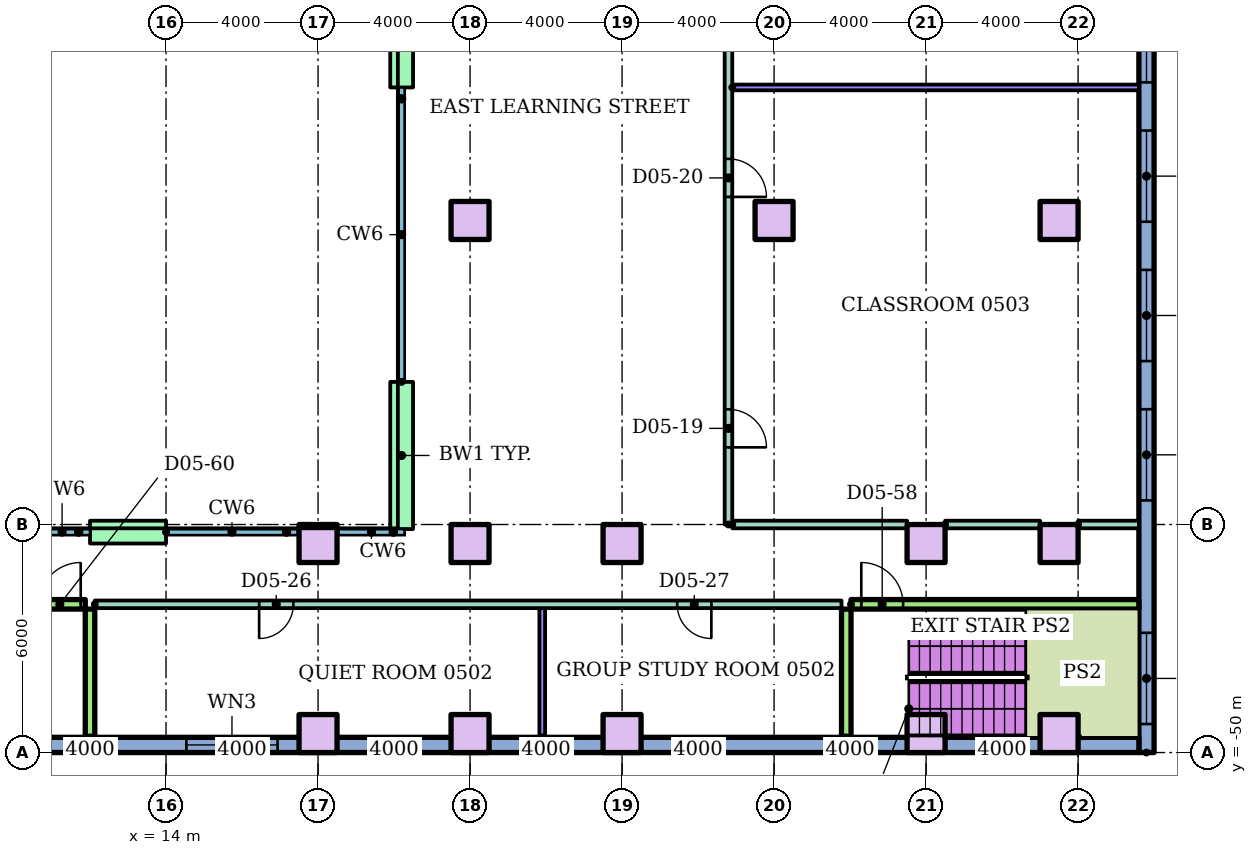
"""IFC4 building model, lengths in metres.
Left out: names, types, materials, properties, quantities, classifications, styles, units other than length and angle.
Written with IfcOpenShell. Run it as: python <this file> out.ifc"""

import sys

from ifc_helpers import new_model, si_unit, direction, frame, frame_2d, origin, origin_2d, place, context, subcontext, project, spatial, rectangle, extrude, element, fill, save


model = new_model("IFC4")
c1 = context("Model", 3, precision=1e-05, world=origin(), true_north=direction((0.0, 1.0)))
c2 = subcontext(c1, "Body", "Model", "MODEL_VIEW")
j1 = project(units=[si_unit("LENGTHUNIT", "METRE"), si_unit("PLANEANGLEUNIT", "RADIAN")], contexts=[c1])
p1 = place(None, origin())
s1 = spatial("IfcSite", under=j1, at=p1, CompositionType="ELEMENT")
p2 = place(p1, origin())
s2 = spatial("IfcBuilding", under=s1, at=p2, CompositionType="ELEMENT")
p3 = place(p2, frame((0.0, 0.0, 22.0)))
s3 = spatial("IfcBuildingStorey", under=s2, at=p3, CompositionType="ELEMENT", Elevation=22.0)
for number, where in (
    (1, (18.0, -49.5, 0.0)),
    (2, (22.0, -49.5, 0.0)),
    (3, (26.0, -49.5, 0.0)),
    (4, (34.0, -49.5, 0.0)),
    (5, (37.5, -49.5, 0.0)),
    (6, (18.0, -44.5, 0.0)),
    (7, (22.0, -44.5, 0.0)),
    (8, (26.0, -44.5, 0.0)),
    (9, (34.0, -44.5, 0.0)),
    (10, (37.5, -44.5, 0.0)),
    (11, (22.0, -36.0, 0.0)),
    (12, (30.0, -36.0, 0.0)),
    (13, (37.5, -36.0, 0.0)),
):
    element("IfcColumn", number, at=place(p3, frame(where)), inside=s3, PredefinedType="COLUMN", context=c2, shape_type="SweptSolid", body=[
        extrude(rectangle(XDim=1.0, YDim=1.0, at=origin_2d()), origin(), (0.0, 0.0, 1.0), 3.7),
    ])
p4 = place(p3, frame((39.8, -50.0, 0.0), z_axis=(0.0, 0.0, 1.0), x_axis=(0.0, 1.0, 0.0)))
e14 = element("IfcWall", 14, at=p4, inside=s3, PredefinedType="STANDARD", context=c2, shape_type="SweptSolid", body=[
    extrude(rectangle(XDim=70.0, YDim=0.4, at=frame_2d((35.0, 0.0))), origin(), (0.0, 0.0, 1.0), 3.7),
])
p5 = place(p4, frame((0.75, 0.0, 0.9)))
e15 = element("IfcOpeningElement", 15, at=p5, cuts=e14, PredefinedType="OPENING", context=c2, shape_type="SweptSolid", body=[
    extrude(rectangle(XDim=2.4, YDim=2.1, at=frame_2d((1.2, 1.05))), frame((0.0, 0.21, 0.0), z_axis=(0.0, -1.0, 0.0), x_axis=(1.0, 0.0, 0.0)), (0.0, 0.0, 1.0), 0.42),
])
p6 = place(p4, frame((6.633, 0.0, 0.9)))
e16 = element("IfcOpeningElement", 16, at=p6, cuts=e14, PredefinedType="OPENING", context=c2, shape_type="SweptSolid", body=[
    extrude(rectangle(XDim=2.4, YDim=2.1, at=frame_2d((1.2, 1.05))), frame((0.0, 0.21, 0.0), z_axis=(0.0, -1.0, 0.0), x_axis=(1.0, 0.0, 0.0)), (0.0, 0.0, 1.0), 0.42),
])
p7 = place(p4, frame((10.3, 0.0, 0.9)))
e17 = element("IfcOpeningElement", 17, at=p7, cuts=e14, PredefinedType="OPENING", context=c2, shape_type="SweptSolid", body=[
    extrude(rectangle(XDim=2.4, YDim=2.1, at=frame_2d((1.2, 1.05))), frame((0.0, 0.21, 0.0), z_axis=(0.0, -1.0, 0.0), x_axis=(1.0, 0.0, 0.0)), (0.0, 0.0, 1.0), 0.42),
])
p8 = place(p4, frame((13.967, 0.0, 0.9)))
e18 = element("IfcOpeningElement", 18, at=p8, cuts=e14, PredefinedType="OPENING", context=c2, shape_type="SweptSolid", body=[
    extrude(rectangle(XDim=2.4, YDim=2.1, at=frame_2d((1.2, 1.05))), frame((0.0, 0.21, 0.0), z_axis=(0.0, -1.0, 0.0), x_axis=(1.0, 0.0, 0.0)), (0.0, 0.0, 1.0), 0.42),
])
p9 = place(p4, frame((17.633, 0.0, 0.9)))
e19 = element("IfcOpeningElement", 19, at=p9, cuts=e14, PredefinedType="OPENING", context=c2, shape_type="SweptSolid", body=[
    extrude(rectangle(XDim=2.4, YDim=2.1, at=frame_2d((1.2, 1.05))), frame((0.0, 0.21, 0.0), z_axis=(0.0, -1.0, 0.0), x_axis=(1.0, 0.0, 0.0)), (0.0, 0.0, 1.0), 0.42),
])
p10 = place(p4, frame((21.3, 0.0, 0.9)))
e20 = element("IfcOpeningElement", 20, at=p10, cuts=e14, PredefinedType="OPENING", context=c2, shape_type="SweptSolid", body=[
    extrude(rectangle(XDim=2.4, YDim=2.1, at=frame_2d((1.2, 1.05))), frame((0.0, 0.21, 0.0), z_axis=(0.0, -1.0, 0.0), x_axis=(1.0, 0.0, 0.0)), (0.0, 0.0, 1.0), 0.42),
])
p11 = place(p4, frame((24.967, 0.0, 0.9)))
e21 = element("IfcOpeningElement", 21, at=p11, cuts=e14, PredefinedType="OPENING", context=c2, shape_type="SweptSolid", body=[
    extrude(rectangle(XDim=2.4, YDim=2.1, at=frame_2d((1.2, 1.05))), frame((0.0, 0.21, 0.0), z_axis=(0.0, -1.0, 0.0), x_axis=(1.0, 0.0, 0.0)), (0.0, 0.0, 1.0), 0.42),
])
p12 = place(p4, frame((28.863, 0.0, 0.9)))
e22 = element("IfcOpeningElement", 22, at=p12, cuts=e14, PredefinedType="OPENING", context=c2, shape_type="SweptSolid", body=[
    extrude(rectangle(XDim=2.4, YDim=2.1, at=frame_2d((1.2, 1.05))), frame((0.0, 0.21, 0.0), z_axis=(0.0, -1.0, 0.0), x_axis=(1.0, 0.0, 0.0)), (0.0, 0.0, 1.0), 0.42),
])
p13 = place(p4, frame((32.988, 0.0, 0.9)))
e23 = element("IfcOpeningElement", 23, at=p13, cuts=e14, PredefinedType="OPENING", context=c2, shape_type="SweptSolid", body=[
    extrude(rectangle(XDim=2.4, YDim=2.1, at=frame_2d((1.2, 1.05))), frame((0.0, 0.21, 0.0), z_axis=(0.0, -1.0, 0.0), x_axis=(1.0, 0.0, 0.0)), (0.0, 0.0, 1.0), 0.42),
])
p14 = place(p4, frame((37.113, 0.0, 0.9)))
e24 = element("IfcOpeningElement", 24, at=p14, cuts=e14, PredefinedType="OPENING", context=c2, shape_type="SweptSolid", body=[
    extrude(rectangle(XDim=2.4, YDim=2.1, at=frame_2d((1.2, 1.05))), frame((0.0, 0.21, 0.0), z_axis=(0.0, -1.0, 0.0), x_axis=(1.0, 0.0, 0.0)), (0.0, 0.0, 1.0), 0.42),
])
p15 = place(p4, frame((41.238, 0.0, 0.9)))
e25 = element("IfcOpeningElement", 25, at=p15, cuts=e14, PredefinedType="OPENING", context=c2, shape_type="SweptSolid", body=[
    extrude(rectangle(XDim=2.4, YDim=2.1, at=frame_2d((1.2, 1.05))), frame((0.0, 0.21, 0.0), z_axis=(0.0, -1.0, 0.0), x_axis=(1.0, 0.0, 0.0)), (0.0, 0.0, 1.0), 0.42),
])
p16 = place(p4, frame((45.363, 0.0, 0.9)))
e26 = element("IfcOpeningElement", 26, at=p16, cuts=e14, PredefinedType="OPENING", context=c2, shape_type="SweptSolid", body=[
    extrude(rectangle(XDim=2.4, YDim=2.1, at=frame_2d((1.2, 1.05))), frame((0.0, 0.21, 0.0), z_axis=(0.0, -1.0, 0.0), x_axis=(1.0, 0.0, 0.0)), (0.0, 0.0, 1.0), 0.42),
])
p17 = place(p4, frame((49.488, 0.0, 0.9)))
e27 = element("IfcOpeningElement", 27, at=p17, cuts=e14, PredefinedType="OPENING", context=c2, shape_type="SweptSolid", body=[
    extrude(rectangle(XDim=2.4, YDim=2.1, at=frame_2d((1.2, 1.05))), frame((0.0, 0.21, 0.0), z_axis=(0.0, -1.0, 0.0), x_axis=(1.0, 0.0, 0.0)), (0.0, 0.0, 1.0), 0.42),
])
p18 = place(p4, frame((53.613, 0.0, 0.9)))
e28 = element("IfcOpeningElement", 28, at=p18, cuts=e14, PredefinedType="OPENING", context=c2, shape_type="SweptSolid", body=[
    extrude(rectangle(XDim=2.4, YDim=2.1, at=frame_2d((1.2, 1.05))), frame((0.0, 0.21, 0.0), z_axis=(0.0, -1.0, 0.0), x_axis=(1.0, 0.0, 0.0)), (0.0, 0.0, 1.0), 0.42),
])
p19 = place(p4, frame((57.738, 0.0, 0.9)))
e29 = element("IfcOpeningElement", 29, at=p19, cuts=e14, PredefinedType="OPENING", context=c2, shape_type="SweptSolid", body=[
    extrude(rectangle(XDim=2.4, YDim=2.1, at=frame_2d((1.2, 1.05))), frame((0.0, 0.21, 0.0), z_axis=(0.0, -1.0, 0.0), x_axis=(1.0, 0.0, 0.0)), (0.0, 0.0, 1.0), 0.42),
])
p20 = place(p4, frame((62.05, 0.0, 0.9)))
e30 = element("IfcOpeningElement", 30, at=p20, cuts=e14, PredefinedType="OPENING", context=c2, shape_type="SweptSolid", body=[
    extrude(rectangle(XDim=2.4, YDim=2.1, at=frame_2d((1.2, 1.05))), frame((0.0, 0.21, 0.0), z_axis=(0.0, -1.0, 0.0), x_axis=(1.0, 0.0, 0.0)), (0.0, 0.0, 1.0), 0.42),
])
p21 = place(p4, frame((66.55, 0.0, 0.9)))
e31 = element("IfcOpeningElement", 31, at=p21, cuts=e14, PredefinedType="OPENING", context=c2, shape_type="SweptSolid", body=[
    extrude(rectangle(XDim=2.4, YDim=2.1, at=frame_2d((1.2, 1.05))), frame((0.0, 0.21, 0.0), z_axis=(0.0, -1.0, 0.0), x_axis=(1.0, 0.0, 0.0)), (0.0, 0.0, 1.0), 0.42),
])
p22 = place(p3, frame((-39.6, -49.8, 0.0)))
e32 = element("IfcWall", 32, at=p22, inside=s3, PredefinedType="STANDARD", context=c2, shape_type="SweptSolid", body=[
    extrude(rectangle(XDim=79.2, YDim=0.4, at=frame_2d((39.6, 0.0))), origin(), (0.0, 0.0, 1.0), 3.7),
])
p23 = place(p22, frame((10.665, 0.0, 0.9)))
e33 = element("IfcOpeningElement", 33, at=p23, cuts=e32, PredefinedType="OPENING", context=c2, shape_type="SweptSolid", body=[
    extrude(rectangle(XDim=2.4, YDim=2.1, at=frame_2d((1.2, 1.05))), frame((0.0, 0.21, 0.0), z_axis=(0.0, -1.0, 0.0), x_axis=(1.0, 0.0, 0.0)), (0.0, 0.0, 1.0), 0.42),
])
p24 = place(p22, frame((18.665, 0.0, 0.9)))
e34 = element("IfcOpeningElement", 34, at=p24, cuts=e32, PredefinedType="OPENING", context=c2, shape_type="SweptSolid", body=[
    extrude(rectangle(XDim=2.4, YDim=2.1, at=frame_2d((1.2, 1.05))), frame((0.0, 0.21, 0.0), z_axis=(0.0, -1.0, 0.0), x_axis=(1.0, 0.0, 0.0)), (0.0, 0.0, 1.0), 0.42),
])
p25 = place(p22, frame((22.135, 0.0, 0.9)))
e35 = element("IfcOpeningElement", 35, at=p25, cuts=e32, PredefinedType="OPENING", context=c2, shape_type="SweptSolid", body=[
    extrude(rectangle(XDim=2.4, YDim=2.1, at=frame_2d((1.2, 1.05))), frame((0.0, 0.21, 0.0), z_axis=(0.0, -1.0, 0.0), x_axis=(1.0, 0.0, 0.0)), (0.0, 0.0, 1.0), 0.42),
])
p26 = place(p22, frame((30.135, 0.0, 0.9)))
e36 = element("IfcOpeningElement", 36, at=p26, cuts=e32, PredefinedType="OPENING", context=c2, shape_type="SweptSolid", body=[
    extrude(rectangle(XDim=2.05, YDim=2.1, at=frame_2d((1.025, 1.05))), frame((0.0, 0.21, 0.0), z_axis=(0.0, -1.0, 0.0), x_axis=(1.0, 0.0, 0.0)), (0.0, 0.0, 1.0), 0.42),
])
p27 = place(p22, frame((38.135, 0.0, 0.9)))
e37 = element("IfcOpeningElement", 37, at=p27, cuts=e32, PredefinedType="OPENING", context=c2, shape_type="SweptSolid", body=[
    extrude(rectangle(XDim=2.4, YDim=2.1, at=frame_2d((1.2, 1.05))), frame((0.0, 0.21, 0.0), z_axis=(0.0, -1.0, 0.0), x_axis=(1.0, 0.0, 0.0)), (0.0, 0.0, 1.0), 0.42),
])
p28 = place(p22, frame((47.015, 0.0, 0.9)))
e38 = element("IfcOpeningElement", 38, at=p28, cuts=e32, PredefinedType="OPENING", context=c2, shape_type="SweptSolid", body=[
    extrude(rectangle(XDim=1.52, YDim=2.1, at=frame_2d((0.76, 1.05))), frame((0.0, 0.21, 0.0), z_axis=(0.0, -1.0, 0.0), x_axis=(1.0, 0.0, 0.0)), (0.0, 0.0, 1.0), 0.42),
])
p29 = place(p22, frame((54.135, 0.0, 0.9)))
e39 = element("IfcOpeningElement", 39, at=p29, cuts=e32, PredefinedType="OPENING", context=c2, shape_type="SweptSolid", body=[
    extrude(rectangle(XDim=2.4, YDim=2.1, at=frame_2d((1.2, 1.05))), frame((0.0, 0.21, 0.0), z_axis=(0.0, -1.0, 0.0), x_axis=(1.0, 0.0, 0.0)), (0.0, 0.0, 1.0), 0.42),
])
p30 = place(p3, frame((14.0, -44.2, 0.0), z_axis=(0.0, 0.0, 1.0), x_axis=(-1.0, 0.0, 0.0)))
e40 = element("IfcWall", 40, at=p30, inside=s3, PredefinedType="STANDARD", context=c2, shape_type="SweptSolid", body=[
    extrude(rectangle(XDim=2.0, YDim=0.6, at=frame_2d((1.0, 0.0))), origin(), (0.0, 0.0, 1.0), 3.7),
])
p31 = place(p3, frame((20.2, -28.96, 0.0), z_axis=(0.0, 0.0, 1.0), x_axis=(0.0, -1.0, 0.0)))
e41 = element("IfcWall", 41, at=p31, inside=s3, PredefinedType="STANDARD", context=c2, shape_type="SweptSolid", body=[
    extrude(rectangle(XDim=3.54, YDim=0.6, at=frame_2d((1.77, 0.0))), origin(), (0.0, 0.0, 1.0), 3.7),
])
p32 = place(p3, frame((20.2, -40.247, 0.0), z_axis=(0.0, 0.0, 1.0), x_axis=(0.0, -1.0, 0.0)))
e42 = element("IfcWall", 42, at=p32, inside=s3, PredefinedType="STANDARD", context=c2, shape_type="SweptSolid", body=[
    extrude(rectangle(XDim=3.874, YDim=0.6, at=frame_2d((1.937, 0.0))), origin(), (0.0, 0.0, 1.0), 3.7),
])
p33 = place(p3, frame((12.125, -46.1, 0.0)))
e43 = element("IfcWall", 43, at=p33, inside=s3, PredefinedType="PARTITIONING", context=c2, shape_type="SweptSolid", body=[
    extrude(rectangle(XDim=19.65, YDim=0.2, at=frame_2d((9.825, 0.0))), origin(), (0.0, 0.0, 1.0), 3.2),
])
p34 = place(p33, frame((4.325, 0.0, 0.0)))
e44 = element("IfcOpeningElement", 44, at=p34, cuts=e43, PredefinedType="OPENING", context=c2, shape_type="SweptSolid", body=[
    extrude(rectangle(XDim=0.9, YDim=2.1, at=frame_2d((0.45, 1.05))), frame((0.0, 0.11, 0.0), z_axis=(0.0, -1.0, 0.0), x_axis=(1.0, 0.0, 0.0)), (0.0, 0.0, 1.0), 0.22),
])
p35 = place(p33, frame((15.325, 0.0, 0.0)))
e45 = element("IfcOpeningElement", 45, at=p35, cuts=e43, PredefinedType="OPENING", context=c2, shape_type="SweptSolid", body=[
    extrude(rectangle(XDim=0.9, YDim=2.1, at=frame_2d((0.45, 1.05))), frame((0.0, 0.11, 0.0), z_axis=(0.0, -1.0, 0.0), x_axis=(1.0, 0.0, 0.0)), (0.0, 0.0, 1.0), 0.22),
])
p36 = place(p3, frame((4.125, -46.1, 0.0)))
e46 = element("IfcWall", 46, at=p36, inside=s3, PredefinedType="SOLIDWALL", context=c2, shape_type="SweptSolid", body=[
    extrude(rectangle(XDim=7.75, YDim=0.25, at=frame_2d((3.875, 0.0))), origin(), (0.0, 0.0, 1.0), 3.7),
])
p37 = place(p36, frame((6.53, 0.0, 0.0)))
e47 = element("IfcOpeningElement", 47, at=p37, cuts=e46, PredefinedType="OPENING", context=c2, shape_type="SweptSolid", body=[
    extrude(rectangle(XDim=1.1, YDim=2.1, at=frame_2d((0.55, 1.05))), frame((0.0, 0.135, 0.0), z_axis=(0.0, -1.0, 0.0), x_axis=(1.0, 0.0, 0.0)), (0.0, 0.0, 1.0), 0.27),
])
p38 = place(p3, frame((32.025, -46.1, 0.0)))
e48 = element("IfcWall", 48, at=p38, inside=s3, PredefinedType="SOLIDWALL", context=c2, shape_type="SweptSolid", body=[
    extrude(rectangle(XDim=7.575, YDim=0.25, at=frame_2d((3.788, 0.0))), origin(), (0.0, 0.0, 1.0), 3.7),
])
p39 = place(p38, frame((0.27, 0.0, 0.0)))
e49 = element("IfcOpeningElement", 49, at=p39, cuts=e48, PredefinedType="OPENING", context=c2, shape_type="SweptSolid", body=[
    extrude(rectangle(XDim=1.1, YDim=2.1, at=frame_2d((0.55, 1.05))), frame((0.0, 0.135, 0.0), z_axis=(0.0, -1.0, 0.0), x_axis=(1.0, 0.0, 0.0)), (0.0, 0.0, 1.0), 0.27),
])
p40 = place(p3, frame((28.9, -44.0, 0.0)))
e50 = element("IfcWall", 50, at=p40, inside=s3, PredefinedType="PARTITIONING", context=c2, shape_type="SweptSolid", body=[
    extrude(rectangle(XDim=4.6, YDim=0.2, at=frame_2d((2.3, 0.0))), origin(), (0.0, 0.0, 1.0), 3.2),
])
p41 = place(p3, frame((34.5, -44.0, 0.0)))
e51 = element("IfcWall", 51, at=p41, inside=s3, PredefinedType="PARTITIONING", context=c2, shape_type="SweptSolid", body=[
    extrude(rectangle(XDim=2.5, YDim=0.2, at=frame_2d((1.25, 0.0))), origin(), (0.0, 0.0, 1.0), 3.2),
])
p42 = place(p3, frame((38.0, -44.0, 0.0)))
e52 = element("IfcWall", 52, at=p42, inside=s3, PredefinedType="PARTITIONING", context=c2, shape_type="SweptSolid", body=[
    extrude(rectangle(XDim=1.6, YDim=0.2, at=frame_2d((0.8, 0.0))), origin(), (0.0, 0.0, 1.0), 3.2),
])
p43 = place(p3, frame((28.9, -32.5, 0.0)))
e53 = element("IfcWall", 53, at=p43, inside=s3, PredefinedType="PARTITIONING", context=c2, shape_type="SweptSolid", body=[
    extrude(rectangle(XDim=10.7, YDim=0.15, at=frame_2d((5.35, 0.0))), origin(), (0.0, 0.0, 1.0), 3.2),
])
p44 = place(p3, frame((12.0, -49.6, 0.0), z_axis=(0.0, 0.0, 1.0), x_axis=(0.0, 1.0, 0.0)))
e54 = element("IfcWall", 54, at=p44, inside=s3, PredefinedType="SOLIDWALL", context=c2, shape_type="SweptSolid", body=[
    extrude(rectangle(XDim=3.375, YDim=0.25, at=frame_2d((1.688, 0.0))), origin(), (0.0, 0.0, 1.0), 3.7),
])
p45 = place(p3, frame((23.9, -49.6, 0.0), z_axis=(0.0, 0.0, 1.0), x_axis=(0.0, 1.0, 0.0)))
e55 = element("IfcWall", 55, at=p45, inside=s3, PredefinedType="PARTITIONING", context=c2, shape_type="SweptSolid", body=[
    extrude(rectangle(XDim=3.4, YDim=0.15, at=frame_2d((1.7, 0.0))), origin(), (0.0, 0.0, 1.0), 3.2),
])
p46 = place(p3, frame((28.8, -44.0, 0.0), z_axis=(0.0, 0.0, 1.0), x_axis=(0.0, 1.0, 0.0)))
e56 = element("IfcWall", 56, at=p46, inside=s3, PredefinedType="PARTITIONING", context=c2, shape_type="SweptSolid", body=[
    extrude(rectangle(XDim=21.9, YDim=0.2, at=frame_2d((10.95, 0.0))), origin(), (0.0, 0.0, 1.0), 3.2),
])
p47 = place(p46, frame((2.03, 0.0, 0.0)))
e57 = element("IfcOpeningElement", 57, at=p47, cuts=e56, PredefinedType="OPENING", context=c2, shape_type="SweptSolid", body=[
    extrude(rectangle(XDim=1.0, YDim=2.1, at=frame_2d((0.5, 1.05))), frame((0.0, 0.11, 0.0), z_axis=(0.0, -1.0, 0.0), x_axis=(1.0, 0.0, 0.0)), (0.0, 0.0, 1.0), 0.22),
])
p48 = place(p46, frame((8.62, 0.0, 0.0)))
e58 = element("IfcOpeningElement", 58, at=p48, cuts=e56, PredefinedType="OPENING", context=c2, shape_type="SweptSolid", body=[
    extrude(rectangle(XDim=1.0, YDim=2.1, at=frame_2d((0.5, 1.05))), frame((0.0, 0.11, 0.0), z_axis=(0.0, -1.0, 0.0), x_axis=(1.0, 0.0, 0.0)), (0.0, 0.0, 1.0), 0.22),
])
p49 = place(p3, frame((31.9, -49.6, 0.0), z_axis=(0.0, 0.0, 1.0), x_axis=(0.0, 1.0, 0.0)))
e59 = element("IfcWall", 59, at=p49, inside=s3, PredefinedType="SOLIDWALL", context=c2, shape_type="SweptSolid", body=[
    extrude(rectangle(XDim=3.375, YDim=0.25, at=frame_2d((1.688, 0.0))), origin(), (0.0, 0.0, 1.0), 3.7),
])
p50 = place(p5, origin())
e60 = element("IfcWindow", 60, at=p50, inside=s3, PartitioningType="SINGLE_PANEL", PredefinedType="WINDOW", context=c2, shape_type="SweptSolid", body=[
    extrude(rectangle(XDim=2.4, YDim=2.1, at=frame_2d((1.2, 1.05))), frame((0.0, 0.03, 0.0), z_axis=(0.0, -1.0, 0.0), x_axis=(1.0, 0.0, 0.0)), (0.0, 0.0, 1.0), 0.06),
])
fill(e15, e60)
p51 = place(p6, origin())
e61 = element("IfcWindow", 61, at=p51, inside=s3, PartitioningType="SINGLE_PANEL", PredefinedType="WINDOW", context=c2, shape_type="SweptSolid", body=[
    extrude(rectangle(XDim=2.4, YDim=2.1, at=frame_2d((1.2, 1.05))), frame((0.0, 0.03, 0.0), z_axis=(0.0, -1.0, 0.0), x_axis=(1.0, 0.0, 0.0)), (0.0, 0.0, 1.0), 0.06),
])
fill(e16, e61)
p52 = place(p7, origin())
e62 = element("IfcWindow", 62, at=p52, inside=s3, PartitioningType="SINGLE_PANEL", PredefinedType="WINDOW", context=c2, shape_type="SweptSolid", body=[
    extrude(rectangle(XDim=2.4, YDim=2.1, at=frame_2d((1.2, 1.05))), frame((0.0, 0.03, 0.0), z_axis=(0.0, -1.0, 0.0), x_axis=(1.0, 0.0, 0.0)), (0.0, 0.0, 1.0), 0.06),
])
fill(e17, e62)
p53 = place(p8, origin())
e63 = element("IfcWindow", 63, at=p53, inside=s3, PartitioningType="SINGLE_PANEL", PredefinedType="WINDOW", context=c2, shape_type="SweptSolid", body=[
    extrude(rectangle(XDim=2.4, YDim=2.1, at=frame_2d((1.2, 1.05))), frame((0.0, 0.03, 0.0), z_axis=(0.0, -1.0, 0.0), x_axis=(1.0, 0.0, 0.0)), (0.0, 0.0, 1.0), 0.06),
])
fill(e18, e63)
p54 = place(p9, origin())
e64 = element("IfcWindow", 64, at=p54, inside=s3, PartitioningType="SINGLE_PANEL", PredefinedType="WINDOW", context=c2, shape_type="SweptSolid", body=[
    extrude(rectangle(XDim=2.4, YDim=2.1, at=frame_2d((1.2, 1.05))), frame((0.0, 0.03, 0.0), z_axis=(0.0, -1.0, 0.0), x_axis=(1.0, 0.0, 0.0)), (0.0, 0.0, 1.0), 0.06),
])
fill(e19, e64)
p55 = place(p29, origin())
e65 = element("IfcWindow", 65, at=p55, inside=s3, PartitioningType="SINGLE_PANEL", PredefinedType="WINDOW", context=c2, shape_type="SweptSolid", body=[
    extrude(rectangle(XDim=2.4, YDim=2.1, at=frame_2d((1.2, 1.05))), frame((0.0, 0.03, 0.0), z_axis=(0.0, -1.0, 0.0), x_axis=(1.0, 0.0, 0.0)), (0.0, 0.0, 1.0), 0.06),
])
fill(e39, e65)
p56 = place(p47, frame((1.0, 0.0, 0.0), z_axis=(0.0, 0.0, 1.0), x_axis=(-1.0, 0.0, 0.0)))
e66 = element("IfcDoor", 66, at=p56, inside=s3, OperationType="SINGLE_SWING_LEFT", PredefinedType="DOOR", context=c2, shape_type="SweptSolid", body=[
    extrude(rectangle(XDim=1.0, YDim=2.1, at=frame_2d((0.5, 1.05))), frame((0.0, 0.025, 0.0), z_axis=(0.0, -1.0, 0.0), x_axis=(1.0, 0.0, 0.0)), (0.0, 0.0, 1.0), 0.05),
])
fill(e57, e66)
p57 = place(p48, frame((1.0, 0.0, 0.0), z_axis=(0.0, 0.0, 1.0), x_axis=(-1.0, 0.0, 0.0)))
e67 = element("IfcDoor", 67, at=p57, inside=s3, OperationType="SINGLE_SWING_LEFT", PredefinedType="DOOR", context=c2, shape_type="SweptSolid", body=[
    extrude(rectangle(XDim=1.0, YDim=2.1, at=frame_2d((0.5, 1.05))), frame((0.0, 0.025, 0.0), z_axis=(0.0, -1.0, 0.0), x_axis=(1.0, 0.0, 0.0)), (0.0, 0.0, 1.0), 0.05),
])
fill(e58, e67)
p58 = place(p34, frame((0.9, 0.0, 0.0), z_axis=(0.0, 0.0, 1.0), x_axis=(-1.0, 0.0, 0.0)))
e68 = element("IfcDoor", 68, at=p58, inside=s3, OperationType="SINGLE_SWING_LEFT", PredefinedType="DOOR", context=c2, shape_type="SweptSolid", body=[
    extrude(rectangle(XDim=0.9, YDim=2.1, at=frame_2d((0.45, 1.05))), frame((0.0, 0.025, 0.0), z_axis=(0.0, -1.0, 0.0), x_axis=(1.0, 0.0, 0.0)), (0.0, 0.0, 1.0), 0.05),
])
fill(e44, e68)
p59 = place(p35, frame((0.9, 0.0, 0.0), z_axis=(0.0, 0.0, 1.0), x_axis=(-1.0, 0.0, 0.0)))
e69 = element("IfcDoor", 69, at=p59, inside=s3, OperationType="SINGLE_SWING_RIGHT", PredefinedType="DOOR", context=c2, shape_type="SweptSolid", body=[
    extrude(rectangle(XDim=0.9, YDim=2.1, at=frame_2d((0.45, 1.05))), frame((0.0, 0.025, 0.0), z_axis=(0.0, -1.0, 0.0), x_axis=(1.0, 0.0, 0.0)), (0.0, 0.0, 1.0), 0.05),
])
fill(e45, e69)
p60 = place(p39, origin())
e70 = element("IfcDoor", 70, at=p60, inside=s3, OperationType="SINGLE_SWING_LEFT", PredefinedType="DOOR", context=c2, shape_type="SweptSolid", body=[
    extrude(rectangle(XDim=1.1, YDim=2.1, at=frame_2d((0.55, 1.05))), frame((0.0, 0.025, 0.0), z_axis=(0.0, -1.0, 0.0), x_axis=(1.0, 0.0, 0.0)), (0.0, 0.0, 1.0), 0.05),
])
fill(e49, e70)
p61 = place(p37, origin())
e71 = element("IfcDoor", 71, at=p61, inside=s3, OperationType="SINGLE_SWING_RIGHT", PredefinedType="DOOR", context=c2, shape_type="SweptSolid", body=[
    extrude(rectangle(XDim=1.1, YDim=2.1, at=frame_2d((0.55, 1.05))), frame((0.0, 0.025, 0.0), z_axis=(0.0, -1.0, 0.0), x_axis=(1.0, 0.0, 0.0)), (0.0, 0.0, 1.0), 0.05),
])
fill(e47, e71)
save(model, sys.argv[1])
